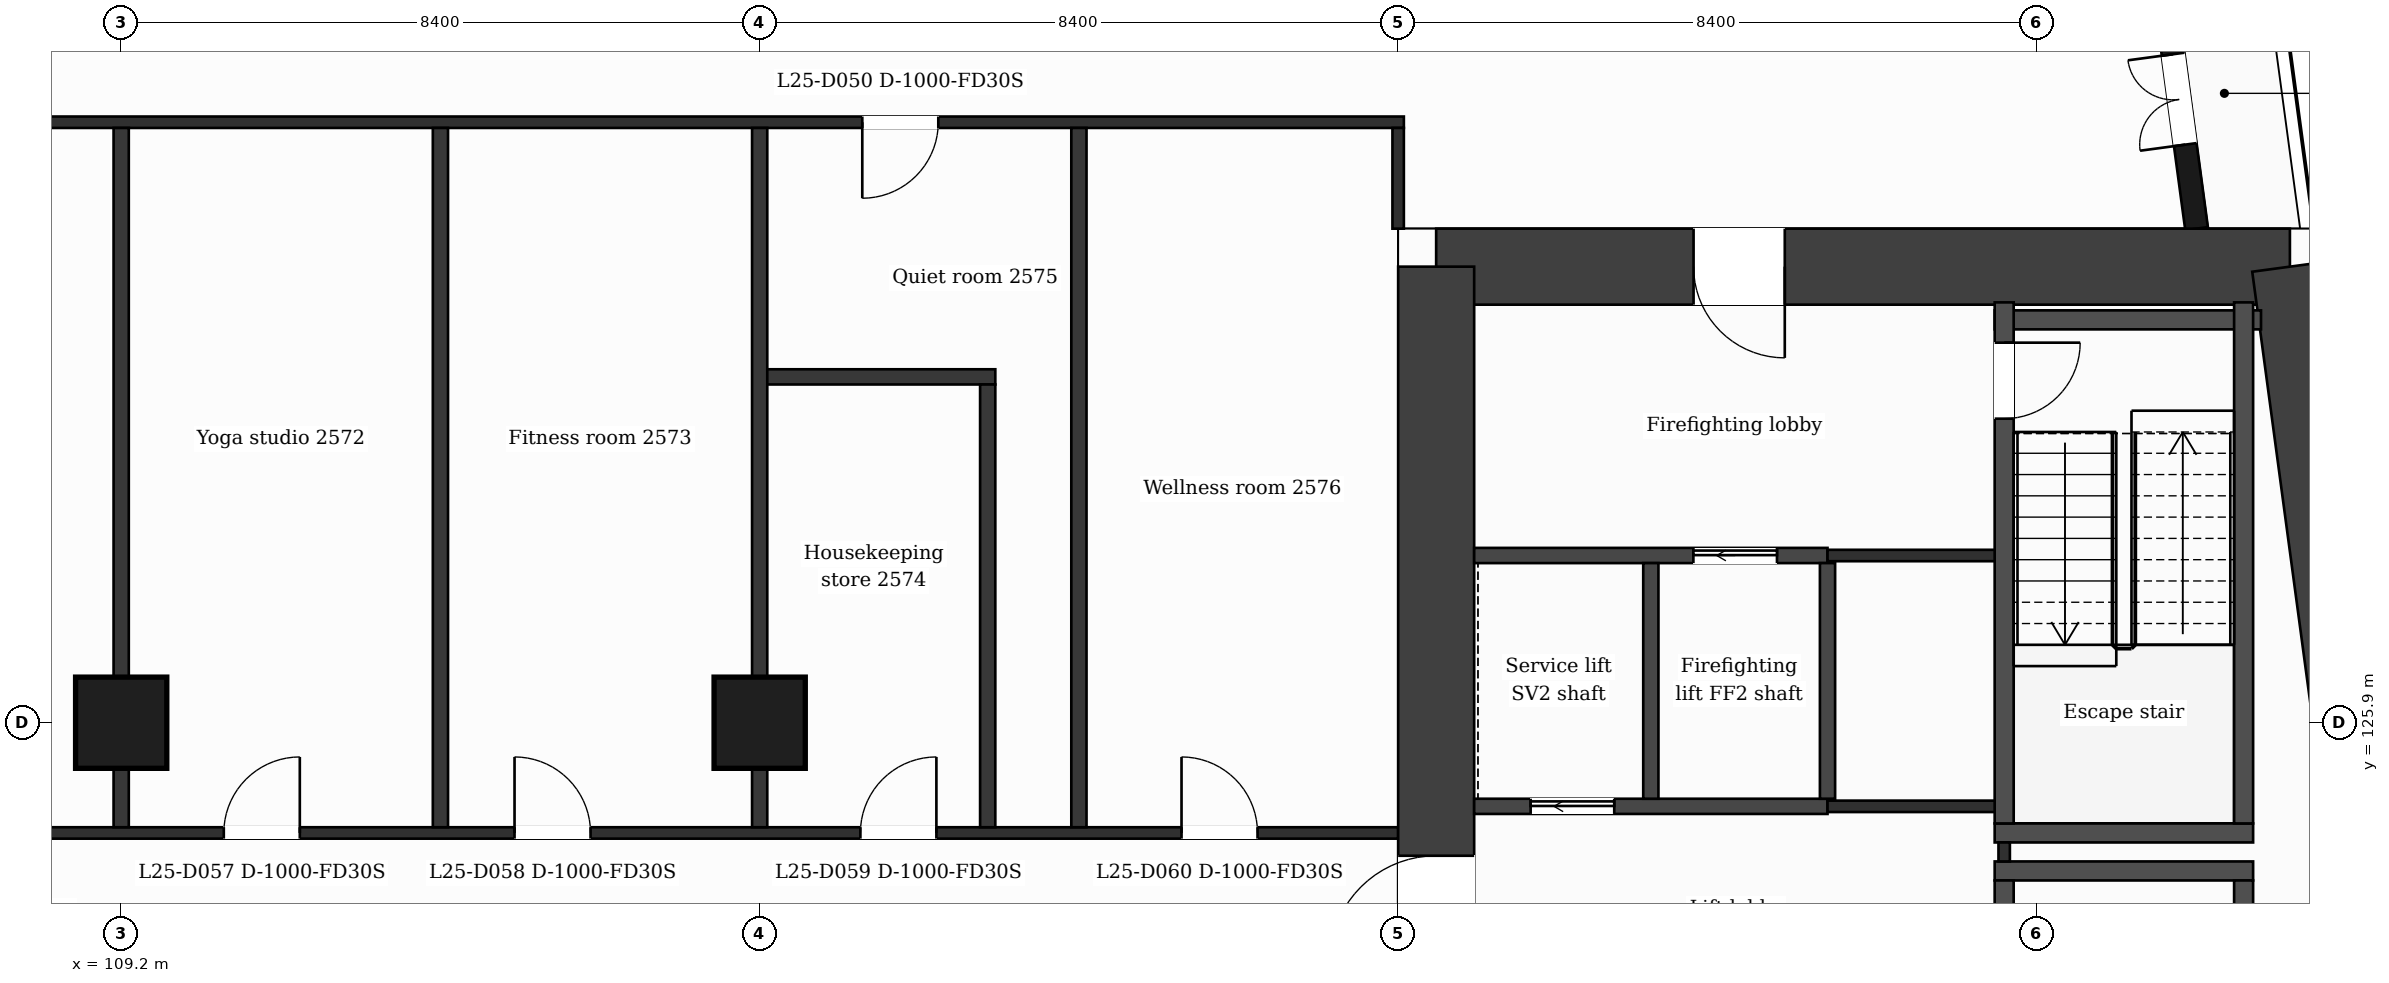
"""IFC4 building model, lengths in metres.
Left out: names, types, materials, properties, quantities, classifications, styles, units other than length and angle.
Written with IfcOpenShell. Run it as: python <this file> out.ifc"""

import sys

from ifc_helpers import new_model, si_unit, direction, frame, frame_2d, origin, origin_2d, place, context, subcontext, project, spatial, rectangle, extrude, element, fill, save


model = new_model("IFC4")
c1 = context("Model", 3, precision=1e-05, world=origin(), true_north=direction((0.0, 1.0)))
c2 = subcontext(c1, "Body", "Model", "MODEL_VIEW")
j1 = project(units=[si_unit("LENGTHUNIT", "METRE"), si_unit("PLANEANGLEUNIT", "RADIAN")], contexts=[c1])
p1 = place(None, origin())
s1 = spatial("IfcSite", under=j1, at=p1, CompositionType="ELEMENT")
p2 = place(p1, origin())
s2 = spatial("IfcBuilding", under=s1, at=p2, CompositionType="ELEMENT")
p3 = place(p2, frame((0.0, 0.0, 109.5)))
s3 = spatial("IfcBuildingStorey", under=s2, at=p3, CompositionType="ELEMENT", Elevation=109.5)
p4 = place(p3, frame((126.5, 131.9, 0.0), z_axis=(0.0, 0.0, 1.0), x_axis=(1.0, 0.0, 0.0)))
e1 = element("IfcWall", 1, at=p4, inside=s3, PredefinedType="SHEAR", context=c2, shape_type="SweptSolid", body=[
    extrude(rectangle(XDim=11.232, YDim=1.0, at=frame_2d((5.616, 0.0))), origin(), (0.0, 0.0, 1.0), 3.7),
])
p5 = place(p4, frame((3.386, 0.0, 0.0)))
e2 = element("IfcOpeningElement", 2, at=p5, cuts=e1, PredefinedType="OPENING", context=c2, shape_type="SweptSolid", body=[
    extrude(rectangle(XDim=1.2, YDim=2.1, at=frame_2d((0.6, 1.05))), frame((0.0, 0.51, 0.0), z_axis=(0.0, -1.0, 0.0), x_axis=(1.0, 0.0, 0.0)), (0.0, 0.0, 1.0), 1.02),
])
p6 = place(p3, frame((137.732, 131.9, 0.0), z_axis=(0.0, 0.0, 1.0), x_axis=(0.133411141623, -0.991060778808, 0.0)))
e3 = element("IfcWall", 3, at=p6, inside=s3, PredefinedType="SHEAR", context=c2, shape_type="SweptSolid", body=[
    extrude(rectangle(XDim=21.189, YDim=1.0, at=frame_2d((10.595, 0.0))), origin(), (0.0, 0.0, 1.0), 3.7),
])
p7 = place(p3, frame((126.5, 110.9, 0.0), z_axis=(0.0, 0.0, 1.0), x_axis=(0.0, 1.0, 0.0)))
e4 = element("IfcWall", 4, at=p7, inside=s3, PredefinedType="SHEAR", context=c2, shape_type="SweptSolid", body=[
    extrude(rectangle(XDim=21.0, YDim=1.0, at=frame_2d((10.5, 0.0))), origin(), (0.0, 0.0, 1.0), 3.7),
])
p8 = place(p7, frame((11.85, 0.0, 0.0)))
e5 = element("IfcOpeningElement", 5, at=p8, cuts=e4, PredefinedType="OPENING", context=c2, shape_type="SweptSolid", body=[
    extrude(rectangle(XDim=1.4, YDim=2.1, at=frame_2d((0.7, 1.05))), frame((0.0, 0.51, 0.0), z_axis=(0.0, -1.0, 0.0), x_axis=(1.0, 0.0, 0.0)), (0.0, 0.0, 1.0), 1.02),
])
for number, where, z_axis, x_axis in (
    (6, (109.2, 125.9, 0.0), (0.0, 0.0, 1.0), (1.0, 0.0, 0.0)),
    (7, (117.6, 125.9, 0.0), (0.0, 0.0, 1.0), (1.0, 0.0, 0.0)),
):
    element("IfcColumn", number, at=place(p3, frame(where, z_axis=z_axis, x_axis=x_axis)), inside=s3, PredefinedType="COLUMN", context=c2, shape_type="SweptSolid", body=[
        extrude(rectangle(XDim=1.2, YDim=1.2, at=origin_2d()), origin(), (0.0, 0.0, 1.0), 3.7),
    ])
p9 = place(p3, frame((136.504, 132.4, 0.0), z_axis=(0.0, 0.0, 1.0), x_axis=(-0.133399697462, 0.99106231929, 0.0)))
e8 = element("IfcWall", 8, at=p9, inside=s3, PredefinedType="SOLIDWALL", context=c2, shape_type="SweptSolid", body=[
    extrude(rectangle(XDim=6.74, YDim=0.3, at=frame_2d((3.37, 0.0))), origin(), (0.0, 0.0, 1.0), 3.38),
])
p10 = place(p9, frame((1.115, 0.0, 0.0)))
e9 = element("IfcOpeningElement", 9, at=p10, cuts=e8, PredefinedType="OPENING", context=c2, shape_type="SweptSolid", body=[
    extrude(rectangle(XDim=1.2, YDim=2.4, at=frame_2d((0.6, 1.2))), frame((0.0, 0.16, 0.0), z_axis=(0.0, -1.0, 0.0), x_axis=(1.0, 0.0, 0.0)), (0.0, 0.0, 1.0), 0.32),
])
p11 = place(p9, frame((4.436, 0.0, 0.9)))
e10 = element("IfcOpeningElement", 10, at=p11, cuts=e8, PredefinedType="OPENING", context=c2, shape_type="SweptSolid", body=[
    extrude(rectangle(XDim=1.2, YDim=2.1, at=frame_2d((0.6, 1.05))), frame((0.0, 0.16, 0.0), z_axis=(0.0, -1.0, 0.0), x_axis=(1.0, 0.0, 0.0)), (0.0, 0.0, 1.0), 0.32),
])
for number, where, z_axis, x_axis in (
    (11, (133.848, 123.95, 0.0), (0.0, 0.0, 1.0), (1.0, 0.0, 0.0)),
    (12, (133.848, 124.45, 0.0), (0.0, 0.0, 1.0), (1.0, 0.0, 0.0)),
):
    element("IfcWall", number, at=place(p3, frame(where, z_axis=z_axis, x_axis=x_axis)), inside=s3, PredefinedType="PARTITIONING", context=c2, shape_type="SweptSolid", body=[
        extrude(rectangle(XDim=3.4, YDim=0.25, at=frame_2d((1.7, 0.0))), origin(), (0.0, 0.0, 1.0), 3.38),
    ])
p12 = place(p3, frame((100.8, 124.45, 0.0), z_axis=(0.0, 0.0, 1.0), x_axis=(1.0, 0.0, 0.0)))
e13 = element("IfcWall", 13, at=p12, inside=s3, PredefinedType="PARTITIONING", context=c2, shape_type="SweptSolid", body=[
    extrude(rectangle(XDim=25.2, YDim=0.15, at=frame_2d((12.6, 0.0))), origin(), (0.0, 0.0, 1.0), 3.38),
])
p13 = place(p12, frame((3.7, 0.0, 0.0)))
e14 = element("IfcOpeningElement", 14, at=p13, cuts=e13, PredefinedType="OPENING", context=c2, shape_type="SweptSolid", body=[
    extrude(rectangle(XDim=1.0, YDim=2.1, at=frame_2d((0.5, 1.05))), frame((0.0, 0.085, 0.0), z_axis=(0.0, -1.0, 0.0), x_axis=(1.0, 0.0, 0.0)), (0.0, 0.0, 1.0), 0.17),
])
p14 = place(p12, frame((9.75, 0.0, 0.0)))
e15 = element("IfcOpeningElement", 15, at=p14, cuts=e13, PredefinedType="OPENING", context=c2, shape_type="SweptSolid", body=[
    extrude(rectangle(XDim=1.0, YDim=2.1, at=frame_2d((0.5, 1.05))), frame((0.0, 0.085, 0.0), z_axis=(0.0, -1.0, 0.0), x_axis=(1.0, 0.0, 0.0)), (0.0, 0.0, 1.0), 0.17),
])
p15 = place(p12, frame((13.575, 0.0, 0.0)))
e16 = element("IfcOpeningElement", 16, at=p15, cuts=e13, PredefinedType="OPENING", context=c2, shape_type="SweptSolid", body=[
    extrude(rectangle(XDim=1.0, YDim=2.1, at=frame_2d((0.5, 1.05))), frame((0.0, 0.085, 0.0), z_axis=(0.0, -1.0, 0.0), x_axis=(1.0, 0.0, 0.0)), (0.0, 0.0, 1.0), 0.17),
])
p16 = place(p12, frame((18.125, 0.0, 0.0)))
e17 = element("IfcOpeningElement", 17, at=p16, cuts=e13, PredefinedType="OPENING", context=c2, shape_type="SweptSolid", body=[
    extrude(rectangle(XDim=1.0, YDim=2.1, at=frame_2d((0.5, 1.05))), frame((0.0, 0.085, 0.0), z_axis=(0.0, -1.0, 0.0), x_axis=(1.0, 0.0, 0.0)), (0.0, 0.0, 1.0), 0.17),
])
p17 = place(p12, frame((22.35, 0.0, 0.0)))
e18 = element("IfcOpeningElement", 18, at=p17, cuts=e13, PredefinedType="OPENING", context=c2, shape_type="SweptSolid", body=[
    extrude(rectangle(XDim=1.0, YDim=2.1, at=frame_2d((0.5, 1.05))), frame((0.0, 0.085, 0.0), z_axis=(0.0, -1.0, 0.0), x_axis=(1.0, 0.0, 0.0)), (0.0, 0.0, 1.0), 0.17),
])
p18 = place(p3, frame((127.0, 124.8, 0.0), z_axis=(0.0, 0.0, 1.0), x_axis=(1.0, 0.0, 0.0)))
e19 = element("IfcWall", 19, at=p18, inside=s3, PredefinedType="PARTITIONING", context=c2, shape_type="SweptSolid", body=[
    extrude(rectangle(XDim=4.649, YDim=0.2, at=frame_2d((2.324, 0.0))), origin(), (0.0, 0.0, 1.0), 3.38),
])
p19 = place(p18, frame((0.743, 0.0, 0.0)))
e20 = element("IfcOpeningElement", 20, at=p19, cuts=e19, PredefinedType="OPENING", context=c2, shape_type="SweptSolid", body=[
    extrude(rectangle(XDim=1.1, YDim=2.1, at=frame_2d((0.55, 1.05))), frame((0.0, 0.11, 0.0), z_axis=(0.0, -1.0, 0.0), x_axis=(1.0, 0.0, 0.0)), (0.0, 0.0, 1.0), 0.22),
])
p20 = place(p3, frame((131.649, 124.8, 0.0), z_axis=(0.0, 0.0, 1.0), x_axis=(1.0, 0.0, 0.0)))
e21 = element("IfcWall", 21, at=p20, inside=s3, PredefinedType="PARTITIONING", context=c2, shape_type="SweptSolid", body=[
    extrude(rectangle(XDim=2.449, YDim=0.15, at=frame_2d((1.225, 0.0))), origin(), (0.0, 0.0, 1.0), 3.38),
])
p21 = place(p3, frame((127.0, 128.1, 0.0), z_axis=(0.0, 0.0, 1.0), x_axis=(1.0, 0.0, 0.0)))
e22 = element("IfcWall", 22, at=p21, inside=s3, PredefinedType="PARTITIONING", context=c2, shape_type="SweptSolid", body=[
    extrude(rectangle(XDim=4.649, YDim=0.2, at=frame_2d((2.324, 0.0))), origin(), (0.0, 0.0, 1.0), 3.38),
])
p22 = place(p21, frame((2.884, 0.0, 0.0)))
e23 = element("IfcOpeningElement", 23, at=p22, cuts=e22, PredefinedType="OPENING", context=c2, shape_type="SweptSolid", body=[
    extrude(rectangle(XDim=1.1, YDim=2.1, at=frame_2d((0.55, 1.05))), frame((0.0, 0.11, 0.0), z_axis=(0.0, -1.0, 0.0), x_axis=(1.0, 0.0, 0.0)), (0.0, 0.0, 1.0), 0.22),
])
p23 = place(p3, frame((131.649, 128.1, 0.0), z_axis=(0.0, 0.0, 1.0), x_axis=(1.0, 0.0, 0.0)))
e24 = element("IfcWall", 24, at=p23, inside=s3, PredefinedType="PARTITIONING", context=c2, shape_type="SweptSolid", body=[
    extrude(rectangle(XDim=2.324, YDim=0.15, at=frame_2d((1.162, 0.0))), origin(), (0.0, 0.0, 1.0), 3.38),
])
p24 = place(p3, frame((117.6, 130.45, 0.0), z_axis=(0.0, 0.0, 1.0), x_axis=(1.0, 0.0, 0.0)))
e25 = element("IfcWall", 25, at=p24, inside=s3, PredefinedType="PARTITIONING", context=c2, shape_type="SweptSolid", body=[
    extrude(rectangle(XDim=3.1, YDim=0.2, at=frame_2d((1.55, 0.0))), origin(), (0.0, 0.0, 1.0), 3.38),
])
p25 = place(p3, frame((133.848, 131.2, 0.0), z_axis=(0.0, 0.0, 1.0), x_axis=(1.0, 0.0, 0.0)))
e26 = element("IfcWall", 26, at=p25, inside=s3, PredefinedType="PARTITIONING", context=c2, shape_type="SweptSolid", body=[
    extrude(rectangle(XDim=3.504, YDim=0.25, at=frame_2d((1.752, 0.0))), origin(), (0.0, 0.0, 1.0), 3.38),
])
p26 = place(p3, frame((100.725, 133.8, 0.0), z_axis=(0.0, 0.0, 1.0), x_axis=(1.0, 0.0, 0.0)))
e27 = element("IfcWall", 27, at=p26, inside=s3, PredefinedType="PARTITIONING", context=c2, shape_type="SweptSolid", body=[
    extrude(rectangle(XDim=25.35, YDim=0.15, at=frame_2d((12.675, 0.0))), origin(), (0.0, 0.0, 1.0), 3.38),
])
p27 = place(p26, frame((18.225, 0.0, 0.0)))
e28 = element("IfcOpeningElement", 28, at=p27, cuts=e27, PredefinedType="OPENING", context=c2, shape_type="SweptSolid", body=[
    extrude(rectangle(XDim=1.0, YDim=2.1, at=frame_2d((0.5, 1.05))), frame((0.0, 0.085, 0.0), z_axis=(0.0, -1.0, 0.0), x_axis=(1.0, 0.0, 0.0)), (0.0, 0.0, 1.0), 0.17),
])
for number, where, z_axis, x_axis in (
    (29, (109.2, 124.525, 0.0), (0.0, 0.0, 1.0), (0.0, 1.0, 0.0)),
    (30, (113.4, 124.525, 0.0), (0.0, 0.0, 1.0), (0.0, 1.0, 0.0)),
    (31, (117.6, 124.525, 0.0), (0.0, 0.0, 1.0), (0.0, 1.0, 0.0)),
):
    element("IfcWall", number, at=place(p3, frame(where, z_axis=z_axis, x_axis=x_axis)), inside=s3, PredefinedType="PARTITIONING", context=c2, shape_type="SweptSolid", body=[
        extrude(rectangle(XDim=9.2, YDim=0.2, at=frame_2d((4.6, 0.0))), origin(), (0.0, 0.0, 1.0), 3.38),
    ])
p28 = place(p3, frame((120.6, 124.525, 0.0), z_axis=(0.0, 0.0, 1.0), x_axis=(0.0, 1.0, 0.0)))
e32 = element("IfcWall", 32, at=p28, inside=s3, PredefinedType="PARTITIONING", context=c2, shape_type="SweptSolid", body=[
    extrude(rectangle(XDim=5.825, YDim=0.2, at=frame_2d((2.913, 0.0))), origin(), (0.0, 0.0, 1.0), 3.38),
])
p29 = place(p3, frame((121.8, 124.525, 0.0), z_axis=(0.0, 0.0, 1.0), x_axis=(0.0, 1.0, 0.0)))
e33 = element("IfcWall", 33, at=p29, inside=s3, PredefinedType="PARTITIONING", context=c2, shape_type="SweptSolid", body=[
    extrude(rectangle(XDim=9.2, YDim=0.2, at=frame_2d((4.6, 0.0))), origin(), (0.0, 0.0, 1.0), 3.38),
])
p30 = place(p3, frame((126.0, 132.4, 0.0), z_axis=(0.0, 0.0, 1.0), x_axis=(0.0, 1.0, 0.0)))
e34 = element("IfcWall", 34, at=p30, inside=s3, PredefinedType="PARTITIONING", context=c2, shape_type="SweptSolid", body=[
    extrude(rectangle(XDim=1.325, YDim=0.15, at=frame_2d((0.663, 0.0))), origin(), (0.0, 0.0, 1.0), 3.38),
])
for number, where, z_axis, x_axis in (
    (35, (129.324, 124.9, 0.0), (0.0, 0.0, 1.0), (0.0, 1.0, 0.0)),
    (36, (131.649, 124.9, 0.0), (0.0, 0.0, 1.0), (0.0, 1.0, 0.0)),
):
    element("IfcWall", number, at=place(p3, frame(where, z_axis=z_axis, x_axis=x_axis)), inside=s3, PredefinedType="PARTITIONING", context=c2, shape_type="SweptSolid", body=[
        extrude(rectangle(XDim=3.1, YDim=0.2, at=frame_2d((1.55, 0.0))), origin(), (0.0, 0.0, 1.0), 3.38),
    ])
p31 = place(p3, frame((133.973, 124.075, 0.0), z_axis=(0.0, 0.0, 1.0), x_axis=(0.0, 1.0, 0.0)))
e37 = element("IfcWall", 37, at=p31, inside=s3, PredefinedType="PARTITIONING", context=c2, shape_type="SweptSolid", body=[
    extrude(rectangle(XDim=0.25, YDim=0.15, at=frame_2d((0.125, 0.0))), origin(), (0.0, 0.0, 1.0), 3.38),
])
p32 = place(p3, frame((133.973, 116.97, 0.0), z_axis=(0.0, 0.0, 1.0), x_axis=(0.0, 1.0, 0.0)))
e38 = element("IfcWall", 38, at=p32, inside=s3, PredefinedType="PARTITIONING", context=c2, shape_type="SweptSolid", body=[
    extrude(rectangle(XDim=6.855, YDim=0.25, at=frame_2d((3.427, 0.0))), origin(), (0.0, 0.0, 1.0), 3.38),
])
p33 = place(p32, frame((5.555, 0.0, 0.0)))
e39 = element("IfcOpeningElement", 39, at=p33, cuts=e38, PredefinedType="OPENING", context=c2, shape_type="SweptSolid", body=[
    extrude(rectangle(XDim=0.95, YDim=2.1, at=frame_2d((0.475, 1.05))), frame((0.0, 0.135, 0.0), z_axis=(0.0, -1.0, 0.0), x_axis=(1.0, 0.0, 0.0)), (0.0, 0.0, 1.0), 0.27),
])
p34 = place(p3, frame((133.973, 124.575, 0.0), z_axis=(0.0, 0.0, 1.0), x_axis=(0.0, 1.0, 0.0)))
e40 = element("IfcWall", 40, at=p34, inside=s3, PredefinedType="PARTITIONING", context=c2, shape_type="SweptSolid", body=[
    extrude(rectangle(XDim=6.855, YDim=0.25, at=frame_2d((3.427, 0.0))), origin(), (0.0, 0.0, 1.0), 3.38),
])
p35 = place(p34, frame((5.325, 0.0, 0.0)))
e41 = element("IfcOpeningElement", 41, at=p35, cuts=e40, PredefinedType="OPENING", context=c2, shape_type="SweptSolid", body=[
    extrude(rectangle(XDim=1.0, YDim=2.1, at=frame_2d((0.5, 1.05))), frame((0.0, 0.135, 0.0), z_axis=(0.0, -1.0, 0.0), x_axis=(1.0, 0.0, 0.0)), (0.0, 0.0, 1.0), 0.27),
])
for number, where, z_axis, x_axis in (
    (42, (137.123, 116.97, 0.0), (0.0, 0.0, 1.0), (0.0, 1.0, 0.0)),
    (43, (137.123, 124.575, 0.0), (0.0, 0.0, 1.0), (0.0, 1.0, 0.0)),
):
    element("IfcWall", number, at=place(p3, frame(where, z_axis=z_axis, x_axis=x_axis)), inside=s3, PredefinedType="PARTITIONING", context=c2, shape_type="SweptSolid", body=[
        extrude(rectangle(XDim=6.855, YDim=0.25, at=frame_2d((3.427, 0.0))), origin(), (0.0, 0.0, 1.0), 3.38),
    ])
p36 = place(p10, origin())
e44 = element("IfcDoor", 44, at=p36, inside=s3, OperationType="DOUBLE_DOOR_SINGLE_SWING", PredefinedType="DOOR", context=c2, shape_type="SweptSolid", body=[
    extrude(rectangle(XDim=1.2, YDim=2.4, at=frame_2d((0.6, 1.2))), frame((0.0, 0.025, 0.0), z_axis=(0.0, -1.0, 0.0), x_axis=(1.0, 0.0, 0.0)), (0.0, 0.0, 1.0), 0.05),
])
fill(e9, e44)
p37 = place(p22, origin())
e45 = element("IfcDoor", 45, at=p37, inside=s3, OperationType="SLIDING_TO_LEFT", PredefinedType="DOOR", context=c2, shape_type="SweptSolid", body=[
    extrude(rectangle(XDim=1.1, YDim=2.1, at=frame_2d((0.55, 1.05))), frame((0.0, 0.025, 0.0), z_axis=(0.0, -1.0, 0.0), x_axis=(1.0, 0.0, 0.0)), (0.0, 0.0, 1.0), 0.05),
])
fill(e23, e45)
p38 = place(p19, origin())
e46 = element("IfcDoor", 46, at=p38, inside=s3, OperationType="SLIDING_TO_LEFT", PredefinedType="DOOR", context=c2, shape_type="SweptSolid", body=[
    extrude(rectangle(XDim=1.1, YDim=2.1, at=frame_2d((0.55, 1.05))), frame((0.0, 0.025, 0.0), z_axis=(0.0, -1.0, 0.0), x_axis=(1.0, 0.0, 0.0)), (0.0, 0.0, 1.0), 0.05),
])
fill(e20, e46)
p39 = place(p35, origin())
e47 = element("IfcDoor", 47, at=p39, inside=s3, OperationType="SINGLE_SWING_RIGHT", PredefinedType="DOOR", context=c2, shape_type="SweptSolid", body=[
    extrude(rectangle(XDim=1.0, YDim=2.1, at=frame_2d((0.5, 1.05))), frame((0.0, 0.025, 0.0), z_axis=(0.0, -1.0, 0.0), x_axis=(1.0, 0.0, 0.0)), (0.0, 0.0, 1.0), 0.05),
])
fill(e41, e47)
p40 = place(p27, origin())
e48 = element("IfcDoor", 48, at=p40, inside=s3, OperationType="SINGLE_SWING_LEFT", PredefinedType="DOOR", context=c2, shape_type="SweptSolid", body=[
    extrude(rectangle(XDim=1.0, YDim=2.1, at=frame_2d((0.5, 1.05))), frame((0.0, 0.025, 0.0), z_axis=(0.0, -1.0, 0.0), x_axis=(1.0, 0.0, 0.0)), (0.0, 0.0, 1.0), 0.05),
])
fill(e28, e48)
p41 = place(p14, origin())
e49 = element("IfcDoor", 49, at=p41, inside=s3, OperationType="SINGLE_SWING_RIGHT", PredefinedType="DOOR", context=c2, shape_type="SweptSolid", body=[
    extrude(rectangle(XDim=1.0, YDim=2.1, at=frame_2d((0.5, 1.05))), frame((0.0, 0.025, 0.0), z_axis=(0.0, -1.0, 0.0), x_axis=(1.0, 0.0, 0.0)), (0.0, 0.0, 1.0), 0.05),
])
fill(e15, e49)
p42 = place(p15, origin())
e50 = element("IfcDoor", 50, at=p42, inside=s3, OperationType="SINGLE_SWING_LEFT", PredefinedType="DOOR", context=c2, shape_type="SweptSolid", body=[
    extrude(rectangle(XDim=1.0, YDim=2.1, at=frame_2d((0.5, 1.05))), frame((0.0, 0.025, 0.0), z_axis=(0.0, -1.0, 0.0), x_axis=(1.0, 0.0, 0.0)), (0.0, 0.0, 1.0), 0.05),
])
fill(e16, e50)
p43 = place(p16, origin())
e51 = element("IfcDoor", 51, at=p43, inside=s3, OperationType="SINGLE_SWING_RIGHT", PredefinedType="DOOR", context=c2, shape_type="SweptSolid", body=[
    extrude(rectangle(XDim=1.0, YDim=2.1, at=frame_2d((0.5, 1.05))), frame((0.0, 0.025, 0.0), z_axis=(0.0, -1.0, 0.0), x_axis=(1.0, 0.0, 0.0)), (0.0, 0.0, 1.0), 0.05),
])
fill(e17, e51)
p44 = place(p17, origin())
e52 = element("IfcDoor", 52, at=p44, inside=s3, OperationType="SINGLE_SWING_LEFT", PredefinedType="DOOR", context=c2, shape_type="SweptSolid", body=[
    extrude(rectangle(XDim=1.0, YDim=2.1, at=frame_2d((0.5, 1.05))), frame((0.0, 0.025, 0.0), z_axis=(0.0, -1.0, 0.0), x_axis=(1.0, 0.0, 0.0)), (0.0, 0.0, 1.0), 0.05),
])
fill(e18, e52)
p45 = place(p5, origin())
e53 = element("IfcDoor", 53, at=p45, inside=s3, OperationType="SINGLE_SWING_RIGHT", PredefinedType="DOOR", context=c2, shape_type="SweptSolid", body=[
    extrude(rectangle(XDim=1.2, YDim=2.1, at=frame_2d((0.6, 1.05))), frame((0.0, 0.025, 0.0), z_axis=(0.0, -1.0, 0.0), x_axis=(1.0, 0.0, 0.0)), (0.0, 0.0, 1.0), 0.05),
])
fill(e2, e53)
p46 = place(p8, origin())
e54 = element("IfcDoor", 54, at=p46, inside=s3, OperationType="SINGLE_SWING_LEFT", PredefinedType="DOOR", context=c2, shape_type="SweptSolid", body=[
    extrude(rectangle(XDim=1.4, YDim=2.1, at=frame_2d((0.7, 1.05))), frame((0.0, 0.025, 0.0), z_axis=(0.0, -1.0, 0.0), x_axis=(1.0, 0.0, 0.0)), (0.0, 0.0, 1.0), 0.05),
])
fill(e5, e54)
save(model, sys.argv[1])
